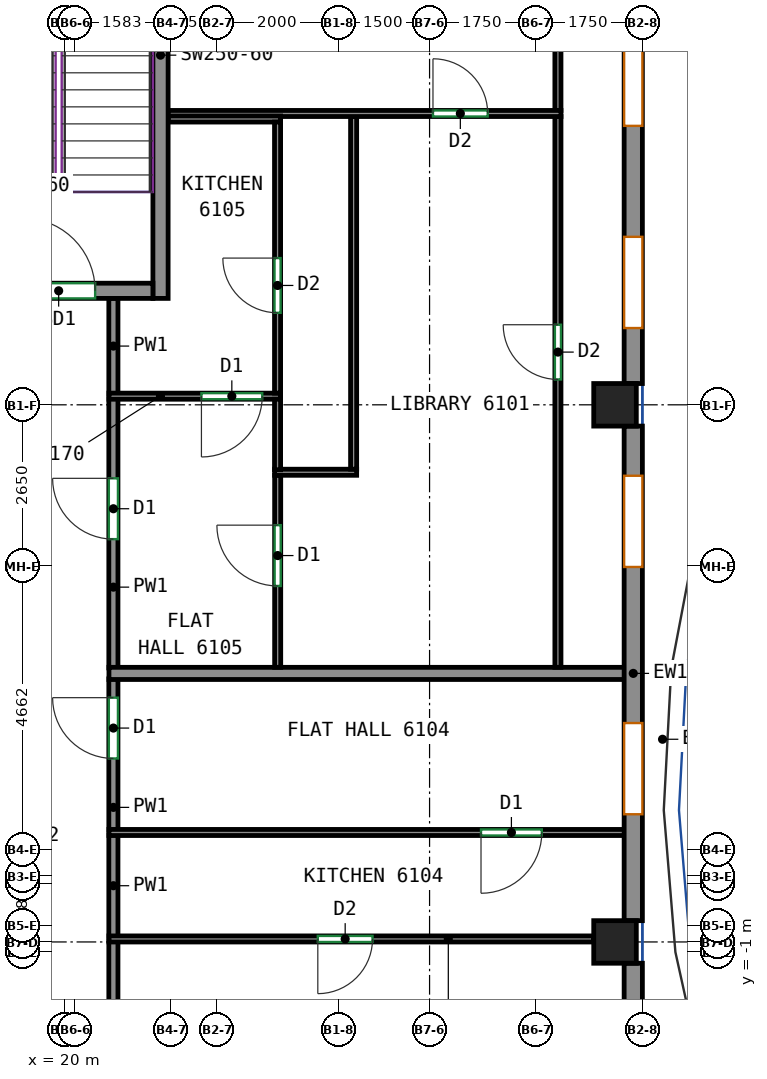
"""IFC4 building model, lengths in metres.
Left out: names, types, materials, properties, quantities, classifications, styles, units other than length and angle.
Written with IfcOpenShell. Run it as: python <this file> out.ifc"""

import sys

from ifc_helpers import new_model, si_unit, direction, frame, frame_2d, origin, origin_2d, place, context, subcontext, project, spatial, rectangle, extrude, source, transform, mapped, element, fill, save


model = new_model("IFC4")
c1 = context("Model", 3, precision=1e-05, world=origin(), true_north=direction((0.0, 1.0)))
c2 = subcontext(c1, "Body", "Model", "MODEL_VIEW")
j1 = project(units=[si_unit("LENGTHUNIT", "METRE"), si_unit("PLANEANGLEUNIT", "RADIAN")], contexts=[c1])
p1 = place(None, origin())
s1 = spatial("IfcSite", under=j1, at=p1, CompositionType="ELEMENT")
p2 = place(p1, origin())
s2 = spatial("IfcBuilding", under=s1, at=p2, CompositionType="ELEMENT")
p3 = place(p2, frame((0.0, 0.0, 252.6)))
s3 = spatial("IfcBuildingStorey", under=s2, at=p3, CompositionType="ELEMENT", Elevation=252.6)
m1 = source(origin(), c2, "Body", "SweptSolid", [
    extrude(rectangle(XDim=0.7, YDim=0.7, at=origin_2d()), origin(), (0.0, 0.0, 1.0), 3.12),
])
for number, where, z_axis, x_axis in (
    (1, (29.05, -0.833, 0.0), (0.0, 0.0, 1.0), (1.0, 0.0, 0.0)),
    (2, (29.05, 8.0, 0.0), (0.0, 0.0, 1.0), (1.0, 0.0, 0.0)),
):
    element("IfcColumn", number, at=place(p3, frame(where, z_axis=z_axis, x_axis=x_axis)), inside=s3, PredefinedType="COLUMN", context=c2, shape_type="MappedRepresentation", body=[
        mapped(m1, transform((0.0, 0.0, 0.0))),
    ])
m2 = source(origin(), c2, "Body", "SweptSolid", [
    extrude(rectangle(XDim=8.0, YDim=0.25, at=frame_2d((4.0, 0.0))), origin(), (0.0, 0.0, 1.0), 3.12),
])
p4 = place(p3, frame((21.575, 9.75, 0.0), z_axis=(0.0, 0.0, 1.0), x_axis=(0.0, 1.0, 0.0)))
e3 = element("IfcWall", 3, at=p4, inside=s3, PredefinedType="SHEAR", context=c2, shape_type="MappedRepresentation", body=[
    mapped(m2, transform((0.0, 0.0, 0.0))),
])
m3 = source(origin(), c2, "Body", "SweptSolid", [
    extrude(rectangle(XDim=3.1, YDim=0.25, at=frame_2d((1.55, 0.0))), origin(), (0.0, 0.0, 1.0), 3.12),
])
p5 = place(p3, frame((18.35, 9.875, 0.0), z_axis=(0.0, 0.0, 1.0), x_axis=(1.0, 0.0, 0.0)))
e4 = element("IfcWall", 4, at=p5, inside=s3, PredefinedType="SHEAR", context=c2, shape_type="MappedRepresentation", body=[
    mapped(m3, transform((0.0, 0.0, 0.0))),
])
p6 = place(p5, frame((0.95, 0.0, 0.0)))
e5 = element("IfcOpeningElement", 5, at=p6, cuts=e4, PredefinedType="OPENING", context=c2, shape_type="SweptSolid", body=[
    extrude(rectangle(XDim=1.2, YDim=2.1, at=frame_2d((0.6, 1.05))), frame((0.0, 0.135, 0.0), z_axis=(0.0, -1.0, 0.0), x_axis=(1.0, 0.0, 0.0)), (0.0, 0.0, 1.0), 0.27),
])
m4 = source(origin(), c2, "Body", "SweptSolid", [
    extrude(rectangle(XDim=8.133, YDim=0.3, at=frame_2d((4.067, 0.0))), origin(), (0.0, 0.0, 1.0), 3.12),
])
p7 = place(p3, frame((29.35, -9.317, 0.0), z_axis=(0.0, 0.0, 1.0), x_axis=(0.0, 1.0, 0.0)))
e6 = element("IfcWall", 6, at=p7, inside=s3, PredefinedType="SOLIDWALL", context=c2, shape_type="MappedRepresentation", body=[
    mapped(m4, transform((0.0, 0.0, 0.0))),
])
p8 = place(p7, frame((1.75, 0.0, 0.8)))
e7 = element("IfcOpeningElement", 7, at=p8, cuts=e6, PredefinedType="OPENING", context=c2, shape_type="SweptSolid", body=[
    extrude(rectangle(XDim=1.5, YDim=2.05, at=frame_2d((0.75, 1.025))), frame((0.0, 0.16, 0.0), z_axis=(0.0, -1.0, 0.0), x_axis=(1.0, 0.0, 0.0)), (0.0, 0.0, 1.0), 0.32),
])
p9 = place(p7, frame((0.45, 0.0, 0.0)))
e8 = element("IfcOpeningElement", 8, at=p9, cuts=e6, PredefinedType="OPENING", context=c2, shape_type="SweptSolid", body=[
    extrude(rectangle(XDim=1.0, YDim=2.1, at=frame_2d((0.5, 1.05))), frame((0.0, 0.16, 0.0), z_axis=(0.0, -1.0, 0.0), x_axis=(1.0, 0.0, 0.0)), (0.0, 0.0, 1.0), 0.32),
])
p10 = place(p7, frame((5.817, 0.0, 0.8)))
e9 = element("IfcOpeningElement", 9, at=p10, cuts=e6, PredefinedType="OPENING", context=c2, shape_type="SweptSolid", body=[
    extrude(rectangle(XDim=1.5, YDim=2.05, at=frame_2d((0.75, 1.025))), frame((0.0, 0.16, 0.0), z_axis=(0.0, -1.0, 0.0), x_axis=(1.0, 0.0, 0.0)), (0.0, 0.0, 1.0), 0.32),
])
p11 = place(p3, frame((29.35, -0.483, 0.0), z_axis=(0.0, 0.0, 1.0), x_axis=(0.0, 1.0, 0.0)))
e10 = element("IfcWall", 10, at=p11, inside=s3, PredefinedType="SOLIDWALL", context=c2, shape_type="MappedRepresentation", body=[
    mapped(m4, transform((0.0, 0.0, 0.0))),
])
p12 = place(p11, frame((1.75, 0.0, 0.8)))
e11 = element("IfcOpeningElement", 11, at=p12, cuts=e10, PredefinedType="OPENING", context=c2, shape_type="SweptSolid", body=[
    extrude(rectangle(XDim=1.5, YDim=2.05, at=frame_2d((0.75, 1.025))), frame((0.0, 0.16, 0.0), z_axis=(0.0, -1.0, 0.0), x_axis=(1.0, 0.0, 0.0)), (0.0, 0.0, 1.0), 0.32),
])
p13 = place(p11, frame((5.817, 0.0, 0.8)))
e12 = element("IfcOpeningElement", 12, at=p13, cuts=e10, PredefinedType="OPENING", context=c2, shape_type="SweptSolid", body=[
    extrude(rectangle(XDim=1.5, YDim=2.05, at=frame_2d((0.75, 1.025))), frame((0.0, 0.16, 0.0), z_axis=(0.0, -1.0, 0.0), x_axis=(1.0, 0.0, 0.0)), (0.0, 0.0, 1.0), 0.32),
])
m5 = source(origin(), c2, "Body", "SweptSolid", [
    extrude(rectangle(XDim=13.3, YDim=0.3, at=frame_2d((6.65, 0.0))), origin(), (0.0, 0.0, 1.0), 3.12),
])
p14 = place(p3, frame((29.35, 8.35, 0.0), z_axis=(0.0, 0.0, 1.0), x_axis=(0.0, 1.0, 0.0)))
e13 = element("IfcWall", 13, at=p14, inside=s3, PredefinedType="SOLIDWALL", context=c2, shape_type="MappedRepresentation", body=[
    mapped(m5, transform((0.0, 0.0, 0.0))),
])
p15 = place(p14, frame((0.913, 0.0, 0.8)))
e14 = element("IfcOpeningElement", 14, at=p15, cuts=e13, PredefinedType="OPENING", context=c2, shape_type="SweptSolid", body=[
    extrude(rectangle(XDim=1.5, YDim=2.05, at=frame_2d((0.75, 1.025))), frame((0.0, 0.16, 0.0), z_axis=(0.0, -1.0, 0.0), x_axis=(1.0, 0.0, 0.0)), (0.0, 0.0, 1.0), 0.32),
])
p16 = place(p14, frame((4.238, 0.0, 0.8)))
e15 = element("IfcOpeningElement", 15, at=p16, cuts=e13, PredefinedType="OPENING", context=c2, shape_type="SweptSolid", body=[
    extrude(rectangle(XDim=1.5, YDim=2.05, at=frame_2d((0.75, 1.025))), frame((0.0, 0.16, 0.0), z_axis=(0.0, -1.0, 0.0), x_axis=(1.0, 0.0, 0.0)), (0.0, 0.0, 1.0), 0.32),
])
p17 = place(p14, frame((7.562, 0.0, 0.8)))
e16 = element("IfcOpeningElement", 16, at=p17, cuts=e13, PredefinedType="OPENING", context=c2, shape_type="SweptSolid", body=[
    extrude(rectangle(XDim=1.5, YDim=2.05, at=frame_2d((0.75, 1.025))), frame((0.0, 0.16, 0.0), z_axis=(0.0, -1.0, 0.0), x_axis=(1.0, 0.0, 0.0)), (0.0, 0.0, 1.0), 0.32),
])
p18 = place(p14, frame((10.887, 0.0, 0.8)))
e17 = element("IfcOpeningElement", 17, at=p18, cuts=e13, PredefinedType="OPENING", context=c2, shape_type="SweptSolid", body=[
    extrude(rectangle(XDim=1.5, YDim=2.05, at=frame_2d((0.75, 1.025))), frame((0.0, 0.16, 0.0), z_axis=(0.0, -1.0, 0.0), x_axis=(1.0, 0.0, 0.0)), (0.0, 0.0, 1.0), 0.32),
])
p19 = place(p3, frame((20.8, -5.984, 0.0), z_axis=(0.0, 0.0, 1.0), x_axis=(0.0, 1.0, 0.0)))
e18 = element("IfcWall", 18, at=p19, inside=s3, PredefinedType="PARTITIONING", context=c2, shape_type="SweptSolid", body=[
    extrude(rectangle(XDim=5.16, YDim=0.15, at=frame_2d((2.58, 0.0))), origin(), (0.0, 0.0, 1.0), 3.12),
])
p20 = place(p3, frame((20.8, -0.744, 0.0), z_axis=(0.0, 0.0, 1.0), x_axis=(0.0, 1.0, 0.0)))
e19 = element("IfcWall", 19, at=p20, inside=s3, PredefinedType="PARTITIONING", context=c2, shape_type="SweptSolid", body=[
    extrude(rectangle(XDim=1.671, YDim=0.15, at=frame_2d((0.835, 0.0))), origin(), (0.0, 0.0, 1.0), 3.12),
])
p21 = place(p3, frame((20.8, 1.007, 0.0), z_axis=(0.0, 0.0, 1.0), x_axis=(0.0, 1.0, 0.0)))
e20 = element("IfcWall", 20, at=p21, inside=s3, PredefinedType="PARTITIONING", context=c2, shape_type="SweptSolid", body=[
    extrude(rectangle(XDim=2.486, YDim=0.15, at=frame_2d((1.243, 0.0))), origin(), (0.0, 0.0, 1.0), 3.12),
])
p22 = place(p21, frame((1.177, 0.0, 0.0)))
e21 = element("IfcOpeningElement", 21, at=p22, cuts=e20, PredefinedType="OPENING", context=c2, shape_type="SweptSolid", body=[
    extrude(rectangle(XDim=1.0, YDim=2.1, at=frame_2d((0.5, 1.05))), frame((0.0, 0.085, 0.0), z_axis=(0.0, -1.0, 0.0), x_axis=(1.0, 0.0, 0.0)), (0.0, 0.0, 1.0), 0.17),
])
p23 = place(p3, frame((20.8, 3.673, 0.0), z_axis=(0.0, 0.0, 1.0), x_axis=(0.0, 1.0, 0.0)))
e22 = element("IfcWall", 22, at=p23, inside=s3, PredefinedType="PARTITIONING", context=c2, shape_type="SweptSolid", body=[
    extrude(rectangle(XDim=4.429, YDim=0.15, at=frame_2d((2.214, 0.0))), origin(), (0.0, 0.0, 1.0), 3.12),
])
p24 = place(p23, frame((2.118, 0.0, 0.0)))
e23 = element("IfcOpeningElement", 23, at=p24, cuts=e22, PredefinedType="OPENING", context=c2, shape_type="SweptSolid", body=[
    extrude(rectangle(XDim=1.0, YDim=2.1, at=frame_2d((0.5, 1.05))), frame((0.0, 0.085, 0.0), z_axis=(0.0, -1.0, 0.0), x_axis=(1.0, 0.0, 0.0)), (0.0, 0.0, 1.0), 0.17),
])
p25 = place(p3, frame((20.8, 8.182, 0.0), z_axis=(0.0, 0.0, 1.0), x_axis=(0.0, 1.0, 0.0)))
e24 = element("IfcWall", 24, at=p25, inside=s3, PredefinedType="PARTITIONING", context=c2, shape_type="SweptSolid", body=[
    extrude(rectangle(XDim=1.568, YDim=0.15, at=frame_2d((0.784, 0.0))), origin(), (0.0, 0.0, 1.0), 3.12),
])
p26 = place(p3, frame((28.7, -0.784, 0.0), z_axis=(0.0, 0.0, 1.0), x_axis=(-1.0, 0.0, 0.0)))
e25 = element("IfcWall", 25, at=p26, inside=s3, PredefinedType="PARTITIONING", context=c2, shape_type="SweptSolid", body=[
    extrude(rectangle(XDim=7.973, YDim=0.1, at=frame_2d((3.986, 0.0))), origin(), (0.0, 0.0, 1.0), 2.57),
])
p27 = place(p26, frame((3.638, 0.0, 0.0)))
e26 = element("IfcOpeningElement", 26, at=p27, cuts=e25, PredefinedType="OPENING", context=c2, shape_type="SweptSolid", body=[
    extrude(rectangle(XDim=0.9, YDim=2.1, at=frame_2d((0.45, 1.05))), frame((0.0, 0.06, 0.0), z_axis=(0.0, -1.0, 0.0), x_axis=(1.0, 0.0, 0.0)), (0.0, 0.0, 1.0), 0.12),
])
p28 = place(p3, frame((29.25, 0.967, 0.0), z_axis=(0.0, 0.0, 1.0), x_axis=(-1.0, 0.0, 0.0)))
e27 = element("IfcWall", 27, at=p28, inside=s3, PredefinedType="PARTITIONING", context=c2, shape_type="SweptSolid", body=[
    extrude(rectangle(XDim=8.523, YDim=0.1, at=frame_2d((4.261, 0.0))), origin(), (0.0, 0.0, 1.0), 3.12),
])
p29 = place(p28, frame((1.404, 0.0, 0.0)))
e28 = element("IfcOpeningElement", 28, at=p29, cuts=e27, PredefinedType="OPENING", context=c2, shape_type="SweptSolid", body=[
    extrude(rectangle(XDim=1.0, YDim=2.1, at=frame_2d((0.5, 1.05))), frame((0.0, 0.06, 0.0), z_axis=(0.0, -1.0, 0.0), x_axis=(1.0, 0.0, 0.0)), (0.0, 0.0, 1.0), 0.12),
])
p30 = place(p3, frame((20.727, 3.583, 0.0), z_axis=(0.0, 0.0, 1.0), x_axis=(1.0, 0.0, 0.0)))
e29 = element("IfcWall", 29, at=p30, inside=s3, PredefinedType="PARTITIONING", context=c2, shape_type="SweptSolid", body=[
    extrude(rectangle(XDim=8.523, YDim=0.2, at=frame_2d((4.261, 0.0))), origin(), (0.0, 0.0, 1.0), 3.12),
])
p31 = place(p3, frame((23.502, 3.683, 0.0), z_axis=(0.0, 0.0, 1.0), x_axis=(0.0, 1.0, 0.0)))
e30 = element("IfcWall", 30, at=p31, inside=s3, PredefinedType="PARTITIONING", context=c2, shape_type="SweptSolid", body=[
    extrude(rectangle(XDim=3.158, YDim=0.1, at=frame_2d((1.579, 0.0))), origin(), (0.0, 0.0, 1.0), 3.12),
])
p32 = place(p31, frame((1.338, 0.0, 0.0)))
e31 = element("IfcOpeningElement", 31, at=p32, cuts=e30, PredefinedType="OPENING", context=c2, shape_type="SweptSolid", body=[
    extrude(rectangle(XDim=1.0, YDim=2.1, at=frame_2d((0.5, 1.05))), frame((0.0, 0.06, 0.0), z_axis=(0.0, -1.0, 0.0), x_axis=(1.0, 0.0, 0.0)), (0.0, 0.0, 1.0), 0.12),
])
p33 = place(p3, frame((28.111, 3.683, 0.0), z_axis=(0.0, 0.0, 1.0), x_axis=(0.0, 1.0, 0.0)))
e32 = element("IfcWall", 32, at=p33, inside=s3, PredefinedType="PARTITIONING", context=c2, shape_type="SweptSolid", body=[
    extrude(rectangle(XDim=9.058, YDim=0.1, at=frame_2d((4.529, 0.0))), origin(), (0.0, 0.0, 1.0), 3.12),
])
p34 = place(p33, frame((4.734, 0.0, 0.0)))
e33 = element("IfcOpeningElement", 33, at=p34, cuts=e32, PredefinedType="OPENING", context=c2, shape_type="SweptSolid", body=[
    extrude(rectangle(XDim=0.9, YDim=2.1, at=frame_2d((0.45, 1.05))), frame((0.0, 0.06, 0.0), z_axis=(0.0, -1.0, 0.0), x_axis=(1.0, 0.0, 0.0)), (0.0, 0.0, 1.0), 0.12),
])
p35 = place(p3, frame((24.801, 6.891, 0.0), z_axis=(0.0, 0.0, 1.0), x_axis=(-1.0, 0.0, 0.0)))
e34 = element("IfcWall", 34, at=p35, inside=s3, PredefinedType="PARTITIONING", context=c2, shape_type="SweptSolid", body=[
    extrude(rectangle(XDim=1.349, YDim=0.1, at=frame_2d((0.675, 0.0))), origin(), (0.0, 0.0, 1.0), 3.12),
])
p36 = place(p3, frame((24.751, 12.741, 0.0), z_axis=(0.0, 0.0, 1.0), x_axis=(0.0, -1.0, 0.0)))
e35 = element("IfcWall", 35, at=p36, inside=s3, PredefinedType="PARTITIONING", context=c2, shape_type="SweptSolid", body=[
    extrude(rectangle(XDim=5.8, YDim=0.1, at=frame_2d((2.9, 0.0))), origin(), (0.0, 0.0, 1.0), 3.12),
])
p37 = place(p3, frame((28.111, 12.841, 0.0), z_axis=(0.0, 0.0, 1.0), x_axis=(0.0, 1.0, 0.0)))
e36 = element("IfcWall", 36, at=p37, inside=s3, PredefinedType="PARTITIONING", context=c2, shape_type="SweptSolid", body=[
    extrude(rectangle(XDim=9.059, YDim=0.1, at=frame_2d((4.529, 0.0))), origin(), (0.0, 0.0, 1.0), 3.12),
])
p38 = place(p3, frame((21.7, 12.791, 0.0), z_axis=(0.0, 0.0, 1.0), x_axis=(1.0, 0.0, 0.0)))
e37 = element("IfcWall", 37, at=p38, inside=s3, PredefinedType="PARTITIONING", context=c2, shape_type="SweptSolid", body=[
    extrude(rectangle(XDim=6.461, YDim=0.1, at=frame_2d((3.23, 0.0))), origin(), (0.0, 0.0, 1.0), 3.12),
])
p39 = place(p38, frame((4.356, 0.0, 0.0)))
e38 = element("IfcOpeningElement", 38, at=p39, cuts=e37, PredefinedType="OPENING", context=c2, shape_type="SweptSolid", body=[
    extrude(rectangle(XDim=0.9, YDim=2.1, at=frame_2d((0.45, 1.05))), frame((0.0, 0.06, 0.0), z_axis=(0.0, -1.0, 0.0), x_axis=(1.0, 0.0, 0.0)), (0.0, 0.0, 1.0), 0.12),
])
p40 = place(p3, frame((23.55, 8.142, 0.0), z_axis=(0.0, 0.0, 1.0), x_axis=(-1.0, 0.0, 0.0)))
e39 = element("IfcWall", 39, at=p40, inside=s3, PredefinedType="PARTITIONING", context=c2, shape_type="SweptSolid", body=[
    extrude(rectangle(XDim=2.823, YDim=0.1, at=frame_2d((1.412, 0.0))), origin(), (0.0, 0.0, 1.0), 2.57),
])
p41 = place(p40, frame((0.302, 0.0, 0.0)))
e40 = element("IfcOpeningElement", 40, at=p41, cuts=e39, PredefinedType="OPENING", context=c2, shape_type="SweptSolid", body=[
    extrude(rectangle(XDim=1.0, YDim=2.1, at=frame_2d((0.5, 1.05))), frame((0.0, 0.06, 0.0), z_axis=(0.0, -1.0, 0.0), x_axis=(1.0, 0.0, 0.0)), (0.0, 0.0, 1.0), 0.12),
])
p42 = place(p3, frame((23.5, 6.932, 0.0), z_axis=(0.0, 0.0, 1.0), x_axis=(0.0, 1.0, 0.0)))
e41 = element("IfcWall", 41, at=p42, inside=s3, PredefinedType="PARTITIONING", context=c2, shape_type="SweptSolid", body=[
    extrude(rectangle(XDim=1.16, YDim=0.1, at=frame_2d((0.58, 0.0))), origin(), (0.0, 0.0, 1.0), 3.12),
])
p43 = place(p3, frame((23.55, 12.7, 0.0), z_axis=(0.0, 0.0, 1.0), x_axis=(-1.0, 0.0, 0.0)))
e42 = element("IfcWall", 42, at=p43, inside=s3, PredefinedType="PARTITIONING", context=c2, shape_type="SweptSolid", body=[
    extrude(rectangle(XDim=1.85, YDim=0.1, at=frame_2d((0.925, 0.0))), origin(), (0.0, 0.0, 1.0), 3.12),
])
p44 = place(p3, frame((23.5, 8.192, 0.0), z_axis=(0.0, 0.0, 1.0), x_axis=(0.0, 1.0, 0.0)))
e43 = element("IfcWall", 43, at=p44, inside=s3, PredefinedType="PARTITIONING", context=c2, shape_type="SweptSolid", body=[
    extrude(rectangle(XDim=4.458, YDim=0.1, at=frame_2d((2.229, 0.0))), origin(), (0.0, 0.0, 1.0), 3.12),
])
p45 = place(p44, frame((1.321, 0.0, 0.0)))
e44 = element("IfcOpeningElement", 44, at=p45, cuts=e43, PredefinedType="OPENING", context=c2, shape_type="SweptSolid", body=[
    extrude(rectangle(XDim=0.9, YDim=2.1, at=frame_2d((0.45, 1.05))), frame((0.0, 0.06, 0.0), z_axis=(0.0, -1.0, 0.0), x_axis=(1.0, 0.0, 0.0)), (0.0, 0.0, 1.0), 0.12),
])
p46 = place(p12, origin())
e45 = element("IfcWindow", 45, at=p46, inside=s3, PartitioningType="SINGLE_PANEL", PredefinedType="WINDOW", context=c2, shape_type="SweptSolid", body=[
    extrude(rectangle(XDim=1.5, YDim=2.05, at=frame_2d((0.75, 1.025))), frame((0.0, 0.03, 0.0), z_axis=(0.0, -1.0, 0.0), x_axis=(1.0, 0.0, 0.0)), (0.0, 0.0, 1.0), 0.06),
])
fill(e11, e45)
p47 = place(p13, origin())
e46 = element("IfcWindow", 46, at=p47, inside=s3, PartitioningType="SINGLE_PANEL", PredefinedType="WINDOW", context=c2, shape_type="SweptSolid", body=[
    extrude(rectangle(XDim=1.5, YDim=2.05, at=frame_2d((0.75, 1.025))), frame((0.0, 0.03, 0.0), z_axis=(0.0, -1.0, 0.0), x_axis=(1.0, 0.0, 0.0)), (0.0, 0.0, 1.0), 0.06),
])
fill(e12, e46)
p48 = place(p15, origin())
e47 = element("IfcWindow", 47, at=p48, inside=s3, PartitioningType="SINGLE_PANEL", PredefinedType="WINDOW", context=c2, shape_type="SweptSolid", body=[
    extrude(rectangle(XDim=1.5, YDim=2.05, at=frame_2d((0.75, 1.025))), frame((0.0, 0.03, 0.0), z_axis=(0.0, -1.0, 0.0), x_axis=(1.0, 0.0, 0.0)), (0.0, 0.0, 1.0), 0.06),
])
fill(e14, e47)
p49 = place(p16, origin())
e48 = element("IfcWindow", 48, at=p49, inside=s3, PartitioningType="SINGLE_PANEL", PredefinedType="WINDOW", context=c2, shape_type="SweptSolid", body=[
    extrude(rectangle(XDim=1.5, YDim=2.05, at=frame_2d((0.75, 1.025))), frame((0.0, 0.03, 0.0), z_axis=(0.0, -1.0, 0.0), x_axis=(1.0, 0.0, 0.0)), (0.0, 0.0, 1.0), 0.06),
])
fill(e15, e48)
p50 = place(p6, origin())
e49 = element("IfcDoor", 49, at=p50, inside=s3, OperationType="DOUBLE_DOOR_SINGLE_SWING", PredefinedType="DOOR", context=c2, shape_type="SweptSolid", body=[
    extrude(rectangle(XDim=1.2, YDim=2.1, at=frame_2d((0.6, 1.05))), frame((0.0, 0.025, 0.0), z_axis=(0.0, -1.0, 0.0), x_axis=(1.0, 0.0, 0.0)), (0.0, 0.0, 1.0), 0.05),
])
fill(e5, e49)
p51 = place(p27, origin())
e50 = element("IfcDoor", 50, at=p51, inside=s3, OperationType="SINGLE_SWING_RIGHT", PredefinedType="DOOR", context=c2, shape_type="SweptSolid", body=[
    extrude(rectangle(XDim=0.9, YDim=2.1, at=frame_2d((0.45, 1.05))), frame((0.0, 0.025, 0.0), z_axis=(0.0, -1.0, 0.0), x_axis=(1.0, 0.0, 0.0)), (0.0, 0.0, 1.0), 0.05),
])
fill(e26, e50)
p52 = place(p29, origin())
e51 = element("IfcDoor", 51, at=p52, inside=s3, OperationType="SINGLE_SWING_RIGHT", PredefinedType="DOOR", context=c2, shape_type="SweptSolid", body=[
    extrude(rectangle(XDim=1.0, YDim=2.1, at=frame_2d((0.5, 1.05))), frame((0.0, 0.025, 0.0), z_axis=(0.0, -1.0, 0.0), x_axis=(1.0, 0.0, 0.0)), (0.0, 0.0, 1.0), 0.05),
])
fill(e28, e51)
p53 = place(p22, origin())
e52 = element("IfcDoor", 52, at=p53, inside=s3, OperationType="SINGLE_SWING_RIGHT", PredefinedType="DOOR", context=c2, shape_type="SweptSolid", body=[
    extrude(rectangle(XDim=1.0, YDim=2.1, at=frame_2d((0.5, 1.05))), frame((0.0, 0.025, 0.0), z_axis=(0.0, -1.0, 0.0), x_axis=(1.0, 0.0, 0.0)), (0.0, 0.0, 1.0), 0.05),
])
fill(e21, e52)
p54 = place(p32, origin())
e53 = element("IfcDoor", 53, at=p54, inside=s3, OperationType="SINGLE_SWING_RIGHT", PredefinedType="DOOR", context=c2, shape_type="SweptSolid", body=[
    extrude(rectangle(XDim=1.0, YDim=2.1, at=frame_2d((0.5, 1.05))), frame((0.0, 0.025, 0.0), z_axis=(0.0, -1.0, 0.0), x_axis=(1.0, 0.0, 0.0)), (0.0, 0.0, 1.0), 0.05),
])
fill(e31, e53)
p55 = place(p24, origin())
e54 = element("IfcDoor", 54, at=p55, inside=s3, OperationType="SINGLE_SWING_RIGHT", PredefinedType="DOOR", context=c2, shape_type="SweptSolid", body=[
    extrude(rectangle(XDim=1.0, YDim=2.1, at=frame_2d((0.5, 1.05))), frame((0.0, 0.025, 0.0), z_axis=(0.0, -1.0, 0.0), x_axis=(1.0, 0.0, 0.0)), (0.0, 0.0, 1.0), 0.05),
])
fill(e23, e54)
p56 = place(p41, origin())
e55 = element("IfcDoor", 55, at=p56, inside=s3, OperationType="SINGLE_SWING_RIGHT", PredefinedType="DOOR", context=c2, shape_type="SweptSolid", body=[
    extrude(rectangle(XDim=1.0, YDim=2.1, at=frame_2d((0.5, 1.05))), frame((0.0, 0.025, 0.0), z_axis=(0.0, -1.0, 0.0), x_axis=(1.0, 0.0, 0.0)), (0.0, 0.0, 1.0), 0.05),
])
fill(e40, e55)
p57 = place(p34, origin())
e56 = element("IfcDoor", 56, at=p57, inside=s3, OperationType="SINGLE_SWING_RIGHT", PredefinedType="DOOR", context=c2, shape_type="SweptSolid", body=[
    extrude(rectangle(XDim=0.9, YDim=2.1, at=frame_2d((0.45, 1.05))), frame((0.0, 0.025, 0.0), z_axis=(0.0, -1.0, 0.0), x_axis=(1.0, 0.0, 0.0)), (0.0, 0.0, 1.0), 0.05),
])
fill(e33, e56)
p58 = place(p45, origin())
e57 = element("IfcDoor", 57, at=p58, inside=s3, OperationType="SINGLE_SWING_RIGHT", PredefinedType="DOOR", context=c2, shape_type="SweptSolid", body=[
    extrude(rectangle(XDim=0.9, YDim=2.1, at=frame_2d((0.45, 1.05))), frame((0.0, 0.025, 0.0), z_axis=(0.0, -1.0, 0.0), x_axis=(1.0, 0.0, 0.0)), (0.0, 0.0, 1.0), 0.05),
])
fill(e44, e57)
p59 = place(p39, origin())
e58 = element("IfcDoor", 58, at=p59, inside=s3, OperationType="SINGLE_SWING_LEFT", PredefinedType="DOOR", context=c2, shape_type="SweptSolid", body=[
    extrude(rectangle(XDim=0.9, YDim=2.1, at=frame_2d((0.45, 1.05))), frame((0.0, 0.025, 0.0), z_axis=(0.0, -1.0, 0.0), x_axis=(1.0, 0.0, 0.0)), (0.0, 0.0, 1.0), 0.05),
])
fill(e38, e58)
save(model, sys.argv[1])
